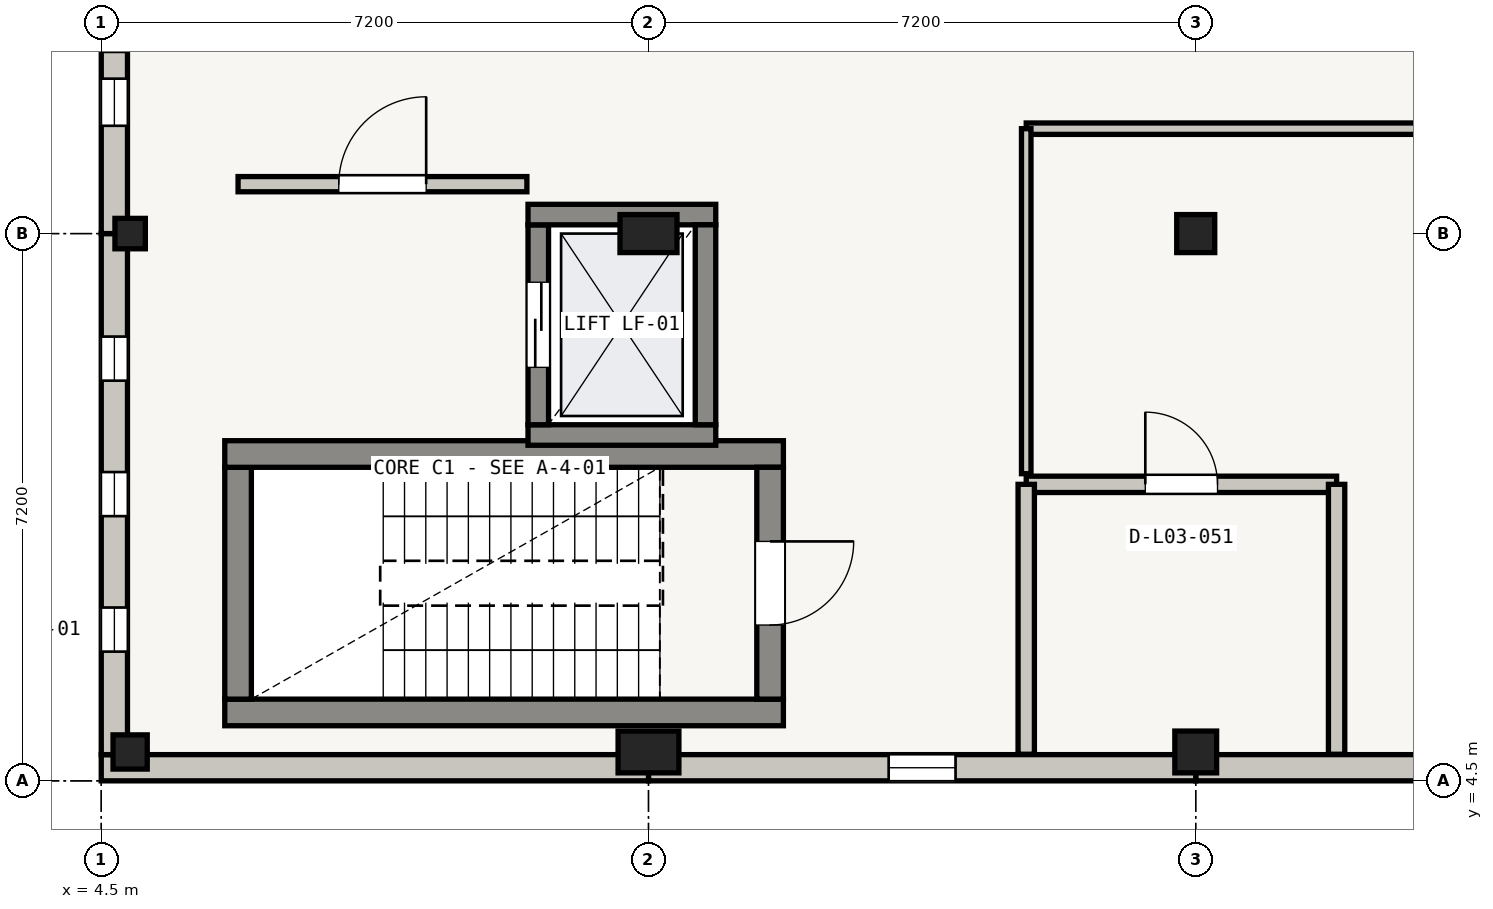
"""IFC4 building model, lengths in metres.
Left out: names, types, materials, properties, quantities, classifications, styles, units other than length and angle.
Written with IfcOpenShell. Run it as: python <this file> out.ifc"""

import sys

from ifc_helpers import new_model, si_unit, direction, frame, frame_2d, origin, origin_2d, place, context, subcontext, project, spatial, rectangle, extrude, element, fill, save


model = new_model("IFC4")
c1 = context("Model", 3, precision=1e-05, world=origin(), true_north=direction((0.0, 1.0)))
c2 = subcontext(c1, "Body", "Model", "MODEL_VIEW")
j1 = project(units=[si_unit("LENGTHUNIT", "METRE"), si_unit("PLANEANGLEUNIT", "RADIAN")], contexts=[c1])
p1 = place(None, origin())
s1 = spatial("IfcSite", under=j1, at=p1, CompositionType="ELEMENT")
p2 = place(p1, origin())
s2 = spatial("IfcBuilding", under=s1, at=p2, CompositionType="ELEMENT")
p3 = place(p2, frame((0.0, 0.0, 12.9)))
s3 = spatial("IfcBuildingStorey", under=s2, at=p3, CompositionType="ELEMENT", Elevation=12.9)
p4 = place(p3, frame((4.88, 4.88, 0.0), z_axis=(0.0, 0.0, 1.0), x_axis=(1.0, 0.0, 0.0)))
e1 = element("IfcColumn", 1, at=p4, inside=s3, PredefinedType="COLUMN", context=c2, shape_type="SweptSolid", body=[
    extrude(rectangle(XDim=0.45, YDim=0.45, at=origin_2d()), origin(), (0.0, 0.0, 1.0), 3.92),
])
p5 = place(p3, frame((4.88, 11.7, 0.0), z_axis=(0.0, 0.0, 1.0), x_axis=(1.0, 0.0, 0.0)))
e2 = element("IfcColumn", 2, at=p5, inside=s3, PredefinedType="COLUMN", context=c2, shape_type="SweptSolid", body=[
    extrude(rectangle(XDim=0.4, YDim=0.4, at=origin_2d()), origin(), (0.0, 0.0, 1.0), 3.92),
])
p6 = place(p3, frame((11.7, 4.88, 0.0), z_axis=(0.0, 0.0, 1.0), x_axis=(1.0, 0.0, 0.0)))
e3 = element("IfcColumn", 3, at=p6, inside=s3, PredefinedType="COLUMN", context=c2, shape_type="SweptSolid", body=[
    extrude(rectangle(XDim=0.8, YDim=0.55, at=origin_2d()), origin(), (0.0, 0.0, 1.0), 3.92),
])
p7 = place(p3, frame((11.7, 11.7, 0.0), z_axis=(0.0, 0.0, 1.0), x_axis=(1.0, 0.0, 0.0)))
e4 = element("IfcColumn", 4, at=p7, inside=s3, PredefinedType="COLUMN", context=c2, shape_type="SweptSolid", body=[
    extrude(rectangle(XDim=0.75, YDim=0.5, at=origin_2d()), origin(), (0.0, 0.0, 1.0), 3.92),
])
p8 = place(p3, frame((18.9, 4.88, 0.0), z_axis=(0.0, 0.0, 1.0), x_axis=(1.0, 0.0, 0.0)))
e5 = element("IfcColumn", 5, at=p8, inside=s3, PredefinedType="COLUMN", context=c2, shape_type="SweptSolid", body=[
    extrude(rectangle(XDim=0.55, YDim=0.55, at=origin_2d()), origin(), (0.0, 0.0, 1.0), 3.92),
])
p9 = place(p3, frame((18.9, 11.7, 0.0), z_axis=(0.0, 0.0, 1.0), x_axis=(1.0, 0.0, 0.0)))
e6 = element("IfcColumn", 6, at=p9, inside=s3, PredefinedType="COLUMN", context=c2, shape_type="SweptSolid", body=[
    extrude(rectangle(XDim=0.5, YDim=0.5, at=origin_2d()), origin(), (0.0, 0.0, 1.0), 3.92),
])
p10 = place(p3, frame((26.1, 4.673, 0.0), z_axis=(0.0, 0.0, 1.0), x_axis=(-1.0, 0.0, 0.0)))
e7 = element("IfcWall", 7, at=p10, inside=s3, PredefinedType="SOLIDWALL", context=c2, shape_type="SweptSolid", body=[
    extrude(rectangle(XDim=7.2, YDim=0.345, at=frame_2d((3.6, 0.0))), origin(), (0.0, 0.0, 1.0), 2.955),
])
p11 = place(p10, frame((1.328, 0.0, 0.55)))
e8 = element("IfcOpeningElement", 8, at=p11, cuts=e7, PredefinedType="OPENING", context=c2, shape_type="SweptSolid", body=[
    extrude(rectangle(XDim=0.8, YDim=1.8, at=frame_2d((0.4, 0.9))), frame((0.0, 0.172, 0.0), z_axis=(0.0, -1.0, 0.0), x_axis=(1.0, 0.0, 0.0)), (0.0, 0.0, 1.0), 0.345),
])
p12 = place(p10, frame((3.2, 0.0, 0.55)))
e9 = element("IfcOpeningElement", 9, at=p12, cuts=e7, PredefinedType="OPENING", context=c2, shape_type="SweptSolid", body=[
    extrude(rectangle(XDim=0.8, YDim=1.8, at=frame_2d((0.4, 0.9))), frame((0.0, 0.172, 0.0), z_axis=(0.0, -1.0, 0.0), x_axis=(1.0, 0.0, 0.0)), (0.0, 0.0, 1.0), 0.345),
])
p13 = place(p3, frame((18.9, 4.673, 0.0), z_axis=(0.0, 0.0, 1.0), x_axis=(-1.0, 0.0, 0.0)))
e10 = element("IfcWall", 10, at=p13, inside=s3, PredefinedType="SOLIDWALL", context=c2, shape_type="SweptSolid", body=[
    extrude(rectangle(XDim=7.2, YDim=0.345, at=frame_2d((3.6, 0.0))), origin(), (0.0, 0.0, 1.0), 2.955),
])
p14 = place(p13, frame((3.16, 0.0, 0.55)))
e11 = element("IfcOpeningElement", 11, at=p14, cuts=e10, PredefinedType="OPENING", context=c2, shape_type="SweptSolid", body=[
    extrude(rectangle(XDim=0.88, YDim=1.8, at=frame_2d((0.44, 0.9))), frame((0.0, 0.172, 0.0), z_axis=(0.0, -1.0, 0.0), x_axis=(1.0, 0.0, 0.0)), (0.0, 0.0, 1.0), 0.345),
])
p15 = place(p3, frame((11.7, 4.673, 0.0), z_axis=(0.0, 0.0, 1.0), x_axis=(-1.0, 0.0, 0.0)))
e12 = element("IfcWall", 12, at=p15, inside=s3, PredefinedType="SOLIDWALL", context=c2, shape_type="SweptSolid", body=[
    extrude(rectangle(XDim=7.2, YDim=0.345, at=frame_2d((3.6, 0.0))), origin(), (0.0, 0.0, 1.0), 3.305),
])
p16 = place(p3, frame((4.673, 4.845, 0.0), z_axis=(0.0, 0.0, 1.0), x_axis=(0.0, 1.0, 0.0)))
e13 = element("IfcWall", 13, at=p16, inside=s3, PredefinedType="SOLIDWALL", context=c2, shape_type="SweptSolid", body=[
    extrude(rectangle(XDim=6.855, YDim=0.345, at=frame_2d((3.427, 0.0))), origin(), (0.0, 0.0, 1.0), 3.255),
])
p17 = place(p16, frame((1.355, 0.0, 0.55)))
e14 = element("IfcOpeningElement", 14, at=p17, cuts=e13, PredefinedType="OPENING", context=c2, shape_type="SweptSolid", body=[
    extrude(rectangle(XDim=0.58, YDim=2.35, at=frame_2d((0.29, 1.175))), frame((0.0, 0.172, 0.0), z_axis=(0.0, -1.0, 0.0), x_axis=(1.0, 0.0, 0.0)), (0.0, 0.0, 1.0), 0.345),
])
p18 = place(p16, frame((3.137, 0.0, 0.55)))
e15 = element("IfcOpeningElement", 15, at=p18, cuts=e13, PredefinedType="OPENING", context=c2, shape_type="SweptSolid", body=[
    extrude(rectangle(XDim=0.58, YDim=2.35, at=frame_2d((0.29, 1.175))), frame((0.0, 0.172, 0.0), z_axis=(0.0, -1.0, 0.0), x_axis=(1.0, 0.0, 0.0)), (0.0, 0.0, 1.0), 0.345),
])
p19 = place(p16, frame((4.92, 0.0, 0.55)))
e16 = element("IfcOpeningElement", 16, at=p19, cuts=e13, PredefinedType="OPENING", context=c2, shape_type="SweptSolid", body=[
    extrude(rectangle(XDim=0.58, YDim=2.35, at=frame_2d((0.29, 1.175))), frame((0.0, 0.172, 0.0), z_axis=(0.0, -1.0, 0.0), x_axis=(1.0, 0.0, 0.0)), (0.0, 0.0, 1.0), 0.345),
])
p20 = place(p3, frame((4.673, 11.7, 0.0), z_axis=(0.0, 0.0, 1.0), x_axis=(0.0, 1.0, 0.0)))
e17 = element("IfcWall", 17, at=p20, inside=s3, PredefinedType="SOLIDWALL", context=c2, shape_type="SweptSolid", body=[
    extrude(rectangle(XDim=7.2, YDim=0.345, at=frame_2d((3.6, 0.0))), origin(), (0.0, 0.0, 1.0), 3.255),
])
p21 = place(p20, frame((1.418, 0.0, 0.55)))
e18 = element("IfcOpeningElement", 18, at=p21, cuts=e17, PredefinedType="OPENING", context=c2, shape_type="SweptSolid", body=[
    extrude(rectangle(XDim=0.62, YDim=2.35, at=frame_2d((0.31, 1.175))), frame((0.0, 0.172, 0.0), z_axis=(0.0, -1.0, 0.0), x_axis=(1.0, 0.0, 0.0)), (0.0, 0.0, 1.0), 0.345),
])
p22 = place(p20, frame((2.39, 0.0, 0.55)))
e19 = element("IfcOpeningElement", 19, at=p22, cuts=e17, PredefinedType="OPENING", context=c2, shape_type="SweptSolid", body=[
    extrude(rectangle(XDim=0.62, YDim=2.35, at=frame_2d((0.31, 1.175))), frame((0.0, 0.172, 0.0), z_axis=(0.0, -1.0, 0.0), x_axis=(1.0, 0.0, 0.0)), (0.0, 0.0, 1.0), 0.345),
])
p23 = place(p20, frame((5.162, 0.0, 0.55)))
e20 = element("IfcOpeningElement", 20, at=p23, cuts=e17, PredefinedType="OPENING", context=c2, shape_type="SweptSolid", body=[
    extrude(rectangle(XDim=0.62, YDim=2.35, at=frame_2d((0.31, 1.175))), frame((0.0, 0.172, 0.0), z_axis=(0.0, -1.0, 0.0), x_axis=(1.0, 0.0, 0.0)), (0.0, 0.0, 1.0), 0.345),
])
p24 = place(p3, frame((13.475, 5.4, 0.0), z_axis=(0.0, 0.0, 1.0), x_axis=(-1.0, 0.0, 0.0)))
e21 = element("IfcWall", 21, at=p24, inside=s3, PredefinedType="SHEAR", context=c2, shape_type="SweptSolid", body=[
    extrude(rectangle(XDim=7.35, YDim=0.35, at=frame_2d((3.675, 0.0))), origin(), (0.0, 0.0, 1.0), 3.92),
])
p25 = place(p3, frame((6.3, 5.575, 0.0), z_axis=(0.0, 0.0, 1.0), x_axis=(0.0, 1.0, 0.0)))
e22 = element("IfcWall", 22, at=p25, inside=s3, PredefinedType="SHEAR", context=c2, shape_type="SweptSolid", body=[
    extrude(rectangle(XDim=3.05, YDim=0.35, at=frame_2d((1.525, 0.0))), origin(), (0.0, 0.0, 1.0), 3.92),
])
p26 = place(p3, frame((6.125, 8.8, 0.0), z_axis=(0.0, 0.0, 1.0), x_axis=(1.0, 0.0, 0.0)))
e23 = element("IfcWall", 23, at=p26, inside=s3, PredefinedType="SHEAR", context=c2, shape_type="SweptSolid", body=[
    extrude(rectangle(XDim=7.35, YDim=0.35, at=frame_2d((3.675, 0.0))), origin(), (0.0, 0.0, 1.0), 3.92),
])
p27 = place(p3, frame((13.3, 8.625, 0.0), z_axis=(0.0, 0.0, 1.0), x_axis=(0.0, -1.0, 0.0)))
e24 = element("IfcWall", 24, at=p27, inside=s3, PredefinedType="SHEAR", context=c2, shape_type="SweptSolid", body=[
    extrude(rectangle(XDim=3.05, YDim=0.35, at=frame_2d((1.525, 0.0))), origin(), (0.0, 0.0, 1.0), 3.92),
])
p28 = place(p27, frame((0.975, 0.0, 0.0)))
e25 = element("IfcOpeningElement", 25, at=p28, cuts=e24, PredefinedType="OPENING", context=c2, shape_type="SweptSolid", body=[
    extrude(rectangle(XDim=1.1, YDim=2.05, at=frame_2d((0.55, 1.025))), frame((0.0, 0.175, 0.0), z_axis=(0.0, -1.0, 0.0), x_axis=(1.0, 0.0, 0.0)), (0.0, 0.0, 1.0), 0.35),
])
p29 = place(p3, frame((12.585, 9.05, 0.0), z_axis=(0.0, 0.0, 1.0), x_axis=(-1.0, 0.0, 0.0)))
e26 = element("IfcWall", 26, at=p29, inside=s3, PredefinedType="SHEAR", context=c2, shape_type="SweptSolid", body=[
    extrude(rectangle(XDim=2.47, YDim=0.27, at=frame_2d((1.235, 0.0))), origin(), (0.0, 0.0, 1.0), 3.92),
])
p30 = place(p3, frame((10.25, 9.185, 0.0), z_axis=(0.0, 0.0, 1.0), x_axis=(0.0, 1.0, 0.0)))
e27 = element("IfcWall", 27, at=p30, inside=s3, PredefinedType="SHEAR", context=c2, shape_type="SweptSolid", body=[
    extrude(rectangle(XDim=2.63, YDim=0.27, at=frame_2d((1.315, 0.0))), origin(), (0.0, 0.0, 1.0), 3.92),
])
p31 = place(p30, frame((0.755, 0.0, 0.0)))
e28 = element("IfcOpeningElement", 28, at=p31, cuts=e27, PredefinedType="OPENING", context=c2, shape_type="SweptSolid", body=[
    extrude(rectangle(XDim=1.12, YDim=2.1, at=frame_2d((0.56, 1.05))), frame((0.0, 0.135, 0.0), z_axis=(0.0, -1.0, 0.0), x_axis=(1.0, 0.0, 0.0)), (0.0, 0.0, 1.0), 0.27),
])
p32 = place(p3, frame((10.115, 11.95, 0.0), z_axis=(0.0, 0.0, 1.0), x_axis=(1.0, 0.0, 0.0)))
e29 = element("IfcWall", 29, at=p32, inside=s3, PredefinedType="SHEAR", context=c2, shape_type="SweptSolid", body=[
    extrude(rectangle(XDim=2.47, YDim=0.27, at=frame_2d((1.235, 0.0))), origin(), (0.0, 0.0, 1.0), 3.92),
])
p33 = place(p3, frame((12.45, 11.815, 0.0), z_axis=(0.0, 0.0, 1.0), x_axis=(0.0, -1.0, 0.0)))
e30 = element("IfcWall", 30, at=p33, inside=s3, PredefinedType="SHEAR", context=c2, shape_type="SweptSolid", body=[
    extrude(rectangle(XDim=2.63, YDim=0.27, at=frame_2d((1.315, 0.0))), origin(), (0.0, 0.0, 1.0), 3.92),
])
p34 = place(p3, frame((6.3, 12.35, 0.0), z_axis=(0.0, 0.0, 1.0), x_axis=(1.0, 0.0, 0.0)))
e31 = element("IfcWall", 31, at=p34, inside=s3, PredefinedType="SOLIDWALL", context=c2, shape_type="SweptSolid", body=[
    extrude(rectangle(XDim=3.8, YDim=0.2, at=frame_2d((1.9, 0.0))), origin(), (0.0, 0.0, 1.0), 2.94),
])
p35 = place(p34, frame((1.325, 0.0, 0.0)))
e32 = element("IfcOpeningElement", 32, at=p35, cuts=e31, PredefinedType="OPENING", context=c2, shape_type="SweptSolid", body=[
    extrude(rectangle(XDim=1.15, YDim=2.05, at=frame_2d((0.575, 1.025))), frame((0.0, 0.1, 0.0), z_axis=(0.0, -1.0, 0.0), x_axis=(1.0, 0.0, 0.0)), (0.0, 0.0, 1.0), 0.2),
])
p36 = place(p3, frame((16.67, 8.401, 0.0), z_axis=(0.0, 0.0, 1.0), x_axis=(1.0, 0.0, 0.0)))
e33 = element("IfcWall", 33, at=p36, inside=s3, PredefinedType="PLUMBINGWALL", context=c2, shape_type="SweptSolid", body=[
    extrude(rectangle(XDim=4.083, YDim=0.215, at=frame_2d((2.042, 0.0))), origin(), (0.0, 0.0, 1.0), 2.94),
])
p37 = place(p36, frame((1.567, 0.0, 0.0)))
e34 = element("IfcOpeningElement", 34, at=p37, cuts=e33, PredefinedType="OPENING", context=c2, shape_type="SweptSolid", body=[
    extrude(rectangle(XDim=0.95, YDim=2.05, at=frame_2d((0.475, 1.025))), frame((0.0, 0.107, 0.0), z_axis=(0.0, -1.0, 0.0), x_axis=(1.0, 0.0, 0.0)), (0.0, 0.0, 1.0), 0.215),
])
for number, where, z_axis, x_axis in (
    (35, (20.753, 8.401, 0.0), (0.0, 0.0, 1.0), (0.0, -1.0, 0.0)),
    (36, (16.67, 4.85, 0.0), (0.0, 0.0, 1.0), (0.0, 1.0, 0.0)),
):
    element("IfcWall", number, at=place(p3, frame(where, z_axis=z_axis, x_axis=x_axis)), inside=s3, PredefinedType="PLUMBINGWALL", context=c2, shape_type="SweptSolid", body=[
        extrude(rectangle(XDim=3.551, YDim=0.215, at=frame_2d((1.775, 0.0))), origin(), (0.0, 0.0, 1.0), 2.94),
    ])
p38 = place(p3, frame((16.67, 13.08, 0.0), z_axis=(0.0, 0.0, 1.0), x_axis=(1.0, 0.0, 0.0)))
e37 = element("IfcWall", 37, at=p38, inside=s3, PredefinedType="PARTITIONING", context=c2, shape_type="SweptSolid", body=[
    extrude(rectangle(XDim=11.71, YDim=0.15, at=frame_2d((5.855, 0.0))), origin(), (0.0, 0.0, 1.0), 2.94),
])
p39 = place(p38, frame((5.335, 0.0, 0.0)))
e38 = element("IfcOpeningElement", 38, at=p39, cuts=e37, PredefinedType="OPENING", context=c2, shape_type="SweptSolid", body=[
    extrude(rectangle(XDim=1.04, YDim=2.05, at=frame_2d((0.52, 1.025))), frame((0.0, 0.075, 0.0), z_axis=(0.0, -1.0, 0.0), x_axis=(1.0, 0.0, 0.0)), (0.0, 0.0, 1.0), 0.15),
])
p40 = place(p3, frame((16.67, 8.541, 0.0), z_axis=(0.0, 0.0, 1.0), x_axis=(0.0, 1.0, 0.0)))
e39 = element("IfcWall", 39, at=p40, inside=s3, PredefinedType="PARTITIONING", context=c2, shape_type="SweptSolid", body=[
    extrude(rectangle(XDim=4.539, YDim=0.125, at=frame_2d((2.27, 0.0))), origin(), (0.0, 0.0, 1.0), 2.94),
])
p41 = place(p14, origin())
e40 = element("IfcWindow", 40, at=p41, inside=s3, PartitioningType="SINGLE_PANEL", PredefinedType="WINDOW", context=c2, shape_type="SweptSolid", body=[
    extrude(rectangle(XDim=0.88, YDim=1.8, at=frame_2d((0.44, 0.9))), frame((0.0, 0.03, 0.0), z_axis=(0.0, -1.0, 0.0), x_axis=(1.0, 0.0, 0.0)), (0.0, 0.0, 1.0), 0.06),
])
fill(e11, e40)
p42 = place(p17, origin())
e41 = element("IfcWindow", 41, at=p42, inside=s3, PartitioningType="SINGLE_PANEL", PredefinedType="WINDOW", context=c2, shape_type="SweptSolid", body=[
    extrude(rectangle(XDim=0.58, YDim=2.35, at=frame_2d((0.29, 1.175))), frame((0.0, 0.03, 0.0), z_axis=(0.0, -1.0, 0.0), x_axis=(1.0, 0.0, 0.0)), (0.0, 0.0, 1.0), 0.06),
])
fill(e14, e41)
p43 = place(p18, origin())
e42 = element("IfcWindow", 42, at=p43, inside=s3, PartitioningType="SINGLE_PANEL", PredefinedType="WINDOW", context=c2, shape_type="SweptSolid", body=[
    extrude(rectangle(XDim=0.58, YDim=2.35, at=frame_2d((0.29, 1.175))), frame((0.0, 0.03, 0.0), z_axis=(0.0, -1.0, 0.0), x_axis=(1.0, 0.0, 0.0)), (0.0, 0.0, 1.0), 0.06),
])
fill(e15, e42)
p44 = place(p19, origin())
e43 = element("IfcWindow", 43, at=p44, inside=s3, PartitioningType="SINGLE_PANEL", PredefinedType="WINDOW", context=c2, shape_type="SweptSolid", body=[
    extrude(rectangle(XDim=0.58, YDim=2.35, at=frame_2d((0.29, 1.175))), frame((0.0, 0.03, 0.0), z_axis=(0.0, -1.0, 0.0), x_axis=(1.0, 0.0, 0.0)), (0.0, 0.0, 1.0), 0.06),
])
fill(e16, e43)
p45 = place(p21, origin())
e44 = element("IfcWindow", 44, at=p45, inside=s3, PartitioningType="SINGLE_PANEL", PredefinedType="WINDOW", context=c2, shape_type="SweptSolid", body=[
    extrude(rectangle(XDim=0.62, YDim=2.35, at=frame_2d((0.31, 1.175))), frame((0.0, 0.03, 0.0), z_axis=(0.0, -1.0, 0.0), x_axis=(1.0, 0.0, 0.0)), (0.0, 0.0, 1.0), 0.06),
])
fill(e18, e44)
p46 = place(p28, origin())
e45 = element("IfcDoor", 45, at=p46, inside=s3, OperationType="SINGLE_SWING_LEFT", PredefinedType="DOOR", context=c2, shape_type="SweptSolid", body=[
    extrude(rectangle(XDim=1.1, YDim=2.05, at=frame_2d((0.55, 1.025))), frame((0.0, 0.025, 0.0), z_axis=(0.0, -1.0, 0.0), x_axis=(1.0, 0.0, 0.0)), (0.0, 0.0, 1.0), 0.05),
])
fill(e25, e45)
p47 = place(p31, origin())
e46 = element("IfcDoor", 46, at=p47, inside=s3, OperationType="DOUBLE_DOOR_SLIDING", PredefinedType="DOOR", context=c2, shape_type="SweptSolid", body=[
    extrude(rectangle(XDim=1.12, YDim=2.1, at=frame_2d((0.56, 1.05))), frame((0.0, 0.025, 0.0), z_axis=(0.0, -1.0, 0.0), x_axis=(1.0, 0.0, 0.0)), (0.0, 0.0, 1.0), 0.05),
])
fill(e28, e46)
p48 = place(p35, origin())
e47 = element("IfcDoor", 47, at=p48, inside=s3, OperationType="SINGLE_SWING_RIGHT", PredefinedType="DOOR", context=c2, shape_type="SweptSolid", body=[
    extrude(rectangle(XDim=1.15, YDim=2.05, at=frame_2d((0.575, 1.025))), frame((0.0, 0.025, 0.0), z_axis=(0.0, -1.0, 0.0), x_axis=(1.0, 0.0, 0.0)), (0.0, 0.0, 1.0), 0.05),
])
fill(e32, e47)
p49 = place(p37, origin())
e48 = element("IfcDoor", 48, at=p49, inside=s3, OperationType="SINGLE_SWING_LEFT", PredefinedType="DOOR", context=c2, shape_type="SweptSolid", body=[
    extrude(rectangle(XDim=0.95, YDim=2.05, at=frame_2d((0.475, 1.025))), frame((0.0, 0.025, 0.0), z_axis=(0.0, -1.0, 0.0), x_axis=(1.0, 0.0, 0.0)), (0.0, 0.0, 1.0), 0.05),
])
fill(e34, e48)
save(model, sys.argv[1])
